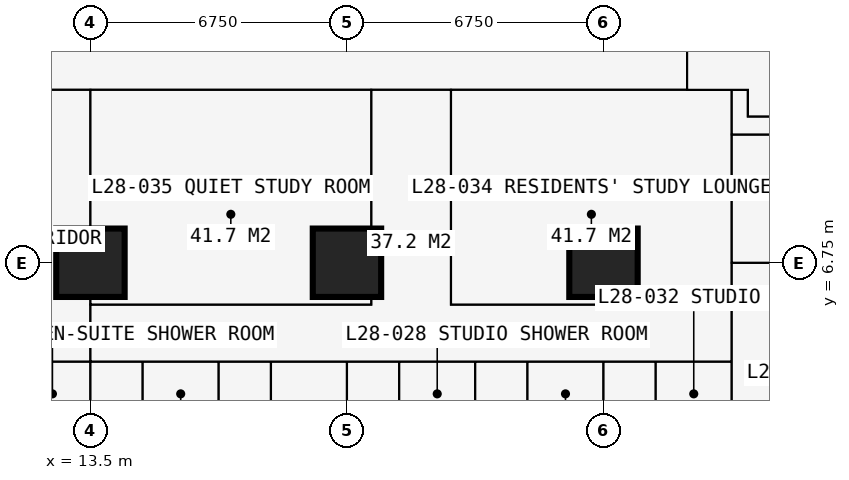
"""IFC4 building model, lengths in metres.
Left out: names, types, materials, properties, quantities, classifications, styles, units other than length and angle.
Written with IfcOpenShell. Run it as: python <this file> out.ifc"""

import sys

from ifc_helpers import new_model, si_unit, direction, frame, frame_2d, origin, origin_2d, place, context, subcontext, project, spatial, rectangle, extrude, element, fill, save


model = new_model("IFC4")
c1 = context("Model", 3, precision=1e-05, world=origin(), true_north=direction((0.0, 1.0)))
c2 = subcontext(c1, "Body", "Model", "MODEL_VIEW")
j1 = project(units=[si_unit("LENGTHUNIT", "METRE"), si_unit("PLANEANGLEUNIT", "RADIAN")], contexts=[c1])
p1 = place(None, origin())
s1 = spatial("IfcSite", under=j1, at=p1, CompositionType="ELEMENT")
p2 = place(p1, origin())
s2 = spatial("IfcBuilding", under=s1, at=p2, CompositionType="ELEMENT")
p3 = place(p2, frame((0.0, 0.0, 105.3)))
s3 = spatial("IfcBuildingStorey", under=s2, at=p3, CompositionType="ELEMENT", Elevation=105.3)
for number, where, z_axis, x_axis in (
    (1, (13.5, 6.75, 0.0), (0.0, 0.0, 1.0), (1.0, 0.0, 0.0)),
    (2, (20.25, 6.75, 0.0), (0.0, 0.0, 1.0), (1.0, 0.0, 0.0)),
    (3, (27.0, 6.75, 0.0), (0.0, 0.0, 1.0), (1.0, 0.0, 0.0)),
):
    element("IfcColumn", number, at=place(p3, frame(where, z_axis=z_axis, x_axis=x_axis)), inside=s3, PredefinedType="COLUMN", context=c2, shape_type="SweptSolid", body=[
        extrude(rectangle(XDim=1.8, YDim=1.8, at=origin_2d()), origin(), (0.0, 0.0, 1.0), 3.6),
    ])
p4 = place(p3, frame((6.75, 4.15, 0.0), z_axis=(0.0, 0.0, 1.0), x_axis=(1.0, 0.0, 0.0)))
e4 = element("IfcWall", 4, at=p4, inside=s3, PredefinedType="PARTITIONING", context=c2, shape_type="SweptSolid", body=[
    extrude(rectangle(XDim=23.625, YDim=0.1, at=frame_2d((11.812, 0.0))), origin(), (0.0, 0.0, 1.0), 3.375),
])
p5 = place(p4, frame((0.2, 0.0, 0.0)))
e5 = element("IfcOpeningElement", 5, at=p5, cuts=e4, PredefinedType="OPENING", context=c2, shape_type="SweptSolid", body=[
    extrude(rectangle(XDim=0.95, YDim=2.2, at=frame_2d((0.475, 1.1))), frame((0.0, 0.06, 0.0), z_axis=(0.0, -1.0, 0.0), x_axis=(1.0, 0.0, 0.0)), (0.0, 0.0, 1.0), 0.12),
])
p6 = place(p4, frame((3.625, 0.0, 0.0)))
e6 = element("IfcOpeningElement", 6, at=p6, cuts=e4, PredefinedType="OPENING", context=c2, shape_type="SweptSolid", body=[
    extrude(rectangle(XDim=0.95, YDim=2.2, at=frame_2d((0.475, 1.1))), frame((0.0, 0.06, 0.0), z_axis=(0.0, -1.0, 0.0), x_axis=(1.0, 0.0, 0.0)), (0.0, 0.0, 1.0), 0.12),
])
p7 = place(p4, frame((6.95, 0.0, 0.0)))
e7 = element("IfcOpeningElement", 7, at=p7, cuts=e4, PredefinedType="OPENING", context=c2, shape_type="SweptSolid", body=[
    extrude(rectangle(XDim=0.95, YDim=2.2, at=frame_2d((0.475, 1.1))), frame((0.0, 0.06, 0.0), z_axis=(0.0, -1.0, 0.0), x_axis=(1.0, 0.0, 0.0)), (0.0, 0.0, 1.0), 0.12),
])
p8 = place(p4, frame((10.375, 0.0, 0.0)))
e8 = element("IfcOpeningElement", 8, at=p8, cuts=e4, PredefinedType="OPENING", context=c2, shape_type="SweptSolid", body=[
    extrude(rectangle(XDim=0.95, YDim=2.2, at=frame_2d((0.475, 1.1))), frame((0.0, 0.06, 0.0), z_axis=(0.0, -1.0, 0.0), x_axis=(1.0, 0.0, 0.0)), (0.0, 0.0, 1.0), 0.12),
])
p9 = place(p4, frame((13.75, 0.0, 0.0)))
e9 = element("IfcOpeningElement", 9, at=p9, cuts=e4, PredefinedType="OPENING", context=c2, shape_type="SweptSolid", body=[
    extrude(rectangle(XDim=0.95, YDim=2.2, at=frame_2d((0.475, 1.1))), frame((0.0, 0.06, 0.0), z_axis=(0.0, -1.0, 0.0), x_axis=(1.0, 0.0, 0.0)), (0.0, 0.0, 1.0), 0.12),
])
p10 = place(p4, frame((17.125, 0.0, 0.0)))
e10 = element("IfcOpeningElement", 10, at=p10, cuts=e4, PredefinedType="OPENING", context=c2, shape_type="SweptSolid", body=[
    extrude(rectangle(XDim=0.95, YDim=2.2, at=frame_2d((0.475, 1.1))), frame((0.0, 0.06, 0.0), z_axis=(0.0, -1.0, 0.0), x_axis=(1.0, 0.0, 0.0)), (0.0, 0.0, 1.0), 0.12),
])
p11 = place(p4, frame((20.5, 0.0, 0.0)))
e11 = element("IfcOpeningElement", 11, at=p11, cuts=e4, PredefinedType="OPENING", context=c2, shape_type="SweptSolid", body=[
    extrude(rectangle(XDim=0.95, YDim=2.2, at=frame_2d((0.475, 1.1))), frame((0.0, 0.06, 0.0), z_axis=(0.0, -1.0, 0.0), x_axis=(1.0, 0.0, 0.0)), (0.0, 0.0, 1.0), 0.12),
])
p12 = place(p3, frame((10.125, 11.3, 0.0), z_axis=(0.0, 0.0, 1.0), x_axis=(1.0, 0.0, 0.0)))
e12 = element("IfcWall", 12, at=p12, inside=s3, PredefinedType="PARTITIONING", context=c2, shape_type="SweptSolid", body=[
    extrude(rectangle(XDim=20.675, YDim=0.15, at=frame_2d((10.337, 0.0))), origin(), (0.0, 0.0, 1.0), 3.375),
])
p13 = place(p12, frame((1.775, 0.0, 0.0)))
e13 = element("IfcOpeningElement", 13, at=p13, cuts=e12, PredefinedType="OPENING", context=c2, shape_type="SweptSolid", body=[
    extrude(rectangle(XDim=1.0, YDim=2.2, at=frame_2d((0.5, 1.1))), frame((0.0, 0.085, 0.0), z_axis=(0.0, -1.0, 0.0), x_axis=(1.0, 0.0, 0.0)), (0.0, 0.0, 1.0), 0.17),
])
p14 = place(p12, frame((11.312, 0.0, 0.0)))
e14 = element("IfcOpeningElement", 14, at=p14, cuts=e12, PredefinedType="OPENING", context=c2, shape_type="SweptSolid", body=[
    extrude(rectangle(XDim=1.0, YDim=2.2, at=frame_2d((0.5, 1.1))), frame((0.0, 0.085, 0.0), z_axis=(0.0, -1.0, 0.0), x_axis=(1.0, 0.0, 0.0)), (0.0, 0.0, 1.0), 0.17),
])
p15 = place(p3, frame((13.5, -0.734, 0.0), z_axis=(0.0, 0.0, 1.0), x_axis=(0.0, 1.0, 0.0)))
e15 = element("IfcWall", 15, at=p15, inside=s3, PredefinedType="PARTITIONING", context=c2, shape_type="SweptSolid", body=[
    extrude(rectangle(XDim=12.034, YDim=0.15, at=frame_2d((6.017, 0.0))), origin(), (0.0, 0.0, 1.0), 2.61),
])
p16 = place(p3, frame((13.5, 5.65, 0.0), z_axis=(0.0, 0.0, 1.0), x_axis=(1.0, 0.0, 0.0)))
e16 = element("IfcWall", 16, at=p16, inside=s3, PredefinedType="PARTITIONING", context=c2, shape_type="SweptSolid", body=[
    extrude(rectangle(XDim=7.387, YDim=0.15, at=frame_2d((3.694, 0.0))), origin(), (0.0, 0.0, 1.0), 3.375),
])
p17 = place(p16, frame((3.2, 0.0, 0.0)))
e17 = element("IfcOpeningElement", 17, at=p17, cuts=e16, PredefinedType="OPENING", context=c2, shape_type="SweptSolid", body=[
    extrude(rectangle(XDim=0.95, YDim=2.2, at=frame_2d((0.475, 1.1))), frame((0.0, 0.085, 0.0), z_axis=(0.0, -1.0, 0.0), x_axis=(1.0, 0.0, 0.0)), (0.0, 0.0, 1.0), 0.17),
])
p18 = place(p3, frame((14.875, 1.95, 0.0), z_axis=(0.0, 0.0, 1.0), x_axis=(0.0, 1.0, 0.0)))
e18 = element("IfcWall", 18, at=p18, inside=s3, PredefinedType="PARTITIONING", context=c2, shape_type="SweptSolid", body=[
    extrude(rectangle(XDim=2.2, YDim=0.1, at=frame_2d((1.1, 0.0))), origin(), (0.0, 0.0, 1.0), 3.375),
])
p19 = place(p18, frame((0.65, 0.0, 0.0)))
e19 = element("IfcOpeningElement", 19, at=p19, cuts=e18, PredefinedType="OPENING", context=c2, shape_type="SweptSolid", body=[
    extrude(rectangle(XDim=0.9, YDim=2.2, at=frame_2d((0.45, 1.1))), frame((0.0, 0.06, 0.0), z_axis=(0.0, -1.0, 0.0), x_axis=(1.0, 0.0, 0.0)), (0.0, 0.0, 1.0), 0.12),
])
p20 = place(p3, frame((16.875, -0.734, 0.0), z_axis=(0.0, 0.0, 1.0), x_axis=(0.0, 1.0, 0.0)))
e20 = element("IfcWall", 20, at=p20, inside=s3, PredefinedType="PARTITIONING", context=c2, shape_type="SweptSolid", body=[
    extrude(rectangle(XDim=4.884, YDim=0.175, at=frame_2d((2.442, 0.0))), origin(), (0.0, 0.0, 1.0), 3.375),
])
p21 = place(p3, frame((18.25, 1.95, 0.0), z_axis=(0.0, 0.0, 1.0), x_axis=(0.0, 1.0, 0.0)))
e21 = element("IfcWall", 21, at=p21, inside=s3, PredefinedType="PARTITIONING", context=c2, shape_type="SweptSolid", body=[
    extrude(rectangle(XDim=2.2, YDim=0.1, at=frame_2d((1.1, 0.0))), origin(), (0.0, 0.0, 1.0), 3.375),
])
p22 = place(p21, frame((0.65, 0.0, 0.0)))
e22 = element("IfcOpeningElement", 22, at=p22, cuts=e21, PredefinedType="OPENING", context=c2, shape_type="SweptSolid", body=[
    extrude(rectangle(XDim=0.9, YDim=2.2, at=frame_2d((0.45, 1.1))), frame((0.0, 0.06, 0.0), z_axis=(0.0, -1.0, 0.0), x_axis=(1.0, 0.0, 0.0)), (0.0, 0.0, 1.0), 0.12),
])
p23 = place(p3, frame((20.25, -0.734, 0.0), z_axis=(0.0, 0.0, 1.0), x_axis=(0.0, 1.0, 0.0)))
e23 = element("IfcWall", 23, at=p23, inside=s3, PredefinedType="PARTITIONING", context=c2, shape_type="SweptSolid", body=[
    extrude(rectangle(XDim=4.884, YDim=0.175, at=frame_2d((2.442, 0.0))), origin(), (0.0, 0.0, 1.0), 2.61),
])
p24 = place(p3, frame((20.887, 5.65, 0.0), z_axis=(0.0, 0.0, 1.0), x_axis=(0.0, 1.0, 0.0)))
e24 = element("IfcWall", 24, at=p24, inside=s3, PredefinedType="PARTITIONING", context=c2, shape_type="SweptSolid", body=[
    extrude(rectangle(XDim=5.65, YDim=0.15, at=frame_2d((2.825, 0.0))), origin(), (0.0, 0.0, 1.0), 3.375),
])
p25 = place(p3, frame((21.625, 1.95, 0.0), z_axis=(0.0, 0.0, 1.0), x_axis=(0.0, 1.0, 0.0)))
e25 = element("IfcWall", 25, at=p25, inside=s3, PredefinedType="PARTITIONING", context=c2, shape_type="SweptSolid", body=[
    extrude(rectangle(XDim=2.2, YDim=0.1, at=frame_2d((1.1, 0.0))), origin(), (0.0, 0.0, 1.0), 3.375),
])
p26 = place(p25, frame((0.65, 0.0, 0.0)))
e26 = element("IfcOpeningElement", 26, at=p26, cuts=e25, PredefinedType="OPENING", context=c2, shape_type="SweptSolid", body=[
    extrude(rectangle(XDim=0.9, YDim=2.2, at=frame_2d((0.45, 1.1))), frame((0.0, 0.06, 0.0), z_axis=(0.0, -1.0, 0.0), x_axis=(1.0, 0.0, 0.0)), (0.0, 0.0, 1.0), 0.12),
])
p27 = place(p3, frame((22.988, 5.65, 0.0), z_axis=(0.0, 0.0, 1.0), x_axis=(1.0, 0.0, 0.0)))
e27 = element("IfcWall", 27, at=p27, inside=s3, PredefinedType="PARTITIONING", context=c2, shape_type="SweptSolid", body=[
    extrude(rectangle(XDim=7.387, YDim=0.15, at=frame_2d((3.694, 0.0))), origin(), (0.0, 0.0, 1.0), 3.375),
])
p28 = place(p27, frame((2.15, 0.0, 0.0)))
e28 = element("IfcOpeningElement", 28, at=p28, cuts=e27, PredefinedType="OPENING", context=c2, shape_type="SweptSolid", body=[
    extrude(rectangle(XDim=0.95, YDim=2.2, at=frame_2d((0.475, 1.1))), frame((0.0, 0.085, 0.0), z_axis=(0.0, -1.0, 0.0), x_axis=(1.0, 0.0, 0.0)), (0.0, 0.0, 1.0), 0.17),
])
p29 = place(p3, frame((22.988, 5.65, 0.0), z_axis=(0.0, 0.0, 1.0), x_axis=(0.0, 1.0, 0.0)))
e29 = element("IfcWall", 29, at=p29, inside=s3, PredefinedType="PARTITIONING", context=c2, shape_type="SweptSolid", body=[
    extrude(rectangle(XDim=5.65, YDim=0.15, at=frame_2d((2.825, 0.0))), origin(), (0.0, 0.0, 1.0), 3.375),
])
p30 = place(p3, frame((23.625, -0.734, 0.0), z_axis=(0.0, 0.0, 1.0), x_axis=(0.0, 1.0, 0.0)))
e30 = element("IfcWall", 30, at=p30, inside=s3, PredefinedType="PARTITIONING", context=c2, shape_type="SweptSolid", body=[
    extrude(rectangle(XDim=4.884, YDim=0.175, at=frame_2d((2.442, 0.0))), origin(), (0.0, 0.0, 1.0), 3.375),
])
p31 = place(p3, frame((25.0, 1.95, 0.0), z_axis=(0.0, 0.0, 1.0), x_axis=(0.0, 1.0, 0.0)))
e31 = element("IfcWall", 31, at=p31, inside=s3, PredefinedType="PARTITIONING", context=c2, shape_type="SweptSolid", body=[
    extrude(rectangle(XDim=2.2, YDim=0.1, at=frame_2d((1.1, 0.0))), origin(), (0.0, 0.0, 1.0), 3.375),
])
p32 = place(p31, frame((0.65, 0.0, 0.0)))
e32 = element("IfcOpeningElement", 32, at=p32, cuts=e31, PredefinedType="OPENING", context=c2, shape_type="SweptSolid", body=[
    extrude(rectangle(XDim=0.9, YDim=2.2, at=frame_2d((0.45, 1.1))), frame((0.0, 0.06, 0.0), z_axis=(0.0, -1.0, 0.0), x_axis=(1.0, 0.0, 0.0)), (0.0, 0.0, 1.0), 0.12),
])
p33 = place(p3, frame((27.0, -0.734, 0.0), z_axis=(0.0, 0.0, 1.0), x_axis=(0.0, 1.0, 0.0)))
e33 = element("IfcWall", 33, at=p33, inside=s3, PredefinedType="PARTITIONING", context=c2, shape_type="SweptSolid", body=[
    extrude(rectangle(XDim=4.884, YDim=0.175, at=frame_2d((2.442, 0.0))), origin(), (0.0, 0.0, 1.0), 2.61),
])
p34 = place(p3, frame((28.375, 1.95, 0.0), z_axis=(0.0, 0.0, 1.0), x_axis=(0.0, 1.0, 0.0)))
e34 = element("IfcWall", 34, at=p34, inside=s3, PredefinedType="PARTITIONING", context=c2, shape_type="SweptSolid", body=[
    extrude(rectangle(XDim=2.2, YDim=0.1, at=frame_2d((1.1, 0.0))), origin(), (0.0, 0.0, 1.0), 3.375),
])
p35 = place(p34, frame((0.65, 0.0, 0.0)))
e35 = element("IfcOpeningElement", 35, at=p35, cuts=e34, PredefinedType="OPENING", context=c2, shape_type="SweptSolid", body=[
    extrude(rectangle(XDim=0.9, YDim=2.2, at=frame_2d((0.45, 1.1))), frame((0.0, 0.06, 0.0), z_axis=(0.0, -1.0, 0.0), x_axis=(1.0, 0.0, 0.0)), (0.0, 0.0, 1.0), 0.12),
])
p36 = place(p3, frame((29.2, 11.3, 0.0), z_axis=(0.0, 0.0, 1.0), x_axis=(0.0, 1.0, 0.0)))
e36 = element("IfcWall", 36, at=p36, inside=s3, PredefinedType="PARTITIONING", context=c2, shape_type="SweptSolid", body=[
    extrude(rectangle(XDim=17.9, YDim=0.2, at=frame_2d((8.95, 0.0))), origin(), (0.0, 0.0, 1.0), 3.375),
])
p37 = place(p36, frame((8.35, 0.0, 0.0)))
e37 = element("IfcOpeningElement", 37, at=p37, cuts=e36, PredefinedType="OPENING", context=c2, shape_type="SweptSolid", body=[
    extrude(rectangle(XDim=1.2, YDim=2.2, at=frame_2d((0.6, 1.1))), frame((0.0, 0.11, 0.0), z_axis=(0.0, -1.0, 0.0), x_axis=(1.0, 0.0, 0.0)), (0.0, 0.0, 1.0), 0.22),
])
p38 = place(p3, frame((30.375, -0.734, 0.0), z_axis=(0.0, 0.0, 1.0), x_axis=(0.0, 1.0, 0.0)))
e38 = element("IfcWall", 38, at=p38, inside=s3, PredefinedType="PARTITIONING", context=c2, shape_type="SweptSolid", body=[
    extrude(rectangle(XDim=12.034, YDim=0.15, at=frame_2d((6.017, 0.0))), origin(), (0.0, 0.0, 1.0), 3.375),
])
p39 = place(p3, frame((30.375, 6.75, 0.0), z_axis=(0.0, 0.0, 1.0), x_axis=(1.0, 0.0, 0.0)))
e39 = element("IfcWall", 39, at=p39, inside=s3, PredefinedType="PARTITIONING", context=c2, shape_type="SweptSolid", body=[
    extrude(rectangle(XDim=10.859, YDim=0.15, at=frame_2d((5.429, 0.0))), origin(), (0.0, 0.0, 1.0), 2.877),
])
p40 = place(p39, frame((1.45, 0.0, 0.0)))
e40 = element("IfcOpeningElement", 40, at=p40, cuts=e39, PredefinedType="OPENING", context=c2, shape_type="SweptSolid", body=[
    extrude(rectangle(XDim=1.0, YDim=2.2, at=frame_2d((0.5, 1.1))), frame((0.0, 0.085, 0.0), z_axis=(0.0, -1.0, 0.0), x_axis=(1.0, 0.0, 0.0)), (0.0, 0.0, 1.0), 0.17),
])
p41 = place(p3, frame((30.375, 10.125, 0.0), z_axis=(0.0, 0.0, 1.0), x_axis=(1.0, 0.0, 0.0)))
e41 = element("IfcWall", 41, at=p41, inside=s3, PredefinedType="PARTITIONING", context=c2, shape_type="SweptSolid", body=[
    extrude(rectangle(XDim=10.859, YDim=0.15, at=frame_2d((5.429, 0.0))), origin(), (0.0, 0.0, 1.0), 3.375),
])
p42 = place(p41, frame((2.5, 0.0, 0.0)))
e42 = element("IfcOpeningElement", 42, at=p42, cuts=e41, PredefinedType="OPENING", context=c2, shape_type="SweptSolid", body=[
    extrude(rectangle(XDim=1.0, YDim=2.2, at=frame_2d((0.5, 1.1))), frame((0.0, 0.085, 0.0), z_axis=(0.0, -1.0, 0.0), x_axis=(1.0, 0.0, 0.0)), (0.0, 0.0, 1.0), 0.17),
])
p43 = place(p3, frame((30.8, 10.6, 0.0), z_axis=(0.0, 0.0, 1.0), x_axis=(0.0, 1.0, 0.0)))
e43 = element("IfcWall", 43, at=p43, inside=s3, PredefinedType="PARTITIONING", context=c2, shape_type="SweptSolid", body=[
    extrude(rectangle(XDim=0.7, YDim=0.15, at=frame_2d((0.35, 0.0))), origin(), (0.0, 0.0, 1.0), 3.375),
])
p44 = place(p3, frame((30.8, 10.6, 0.0), z_axis=(0.0, 0.0, 1.0), x_axis=(1.0, 0.0, 0.0)))
e44 = element("IfcWall", 44, at=p44, inside=s3, PredefinedType="PARTITIONING", context=c2, shape_type="SweptSolid", body=[
    extrude(rectangle(XDim=1.85, YDim=0.15, at=frame_2d((0.925, 0.0))), origin(), (0.0, 0.0, 1.0), 3.375),
])
p45 = place(p13, origin())
e45 = element("IfcDoor", 45, at=p45, inside=s3, OperationType="SINGLE_SWING_LEFT", PredefinedType="DOOR", context=c2, shape_type="SweptSolid", body=[
    extrude(rectangle(XDim=1.0, YDim=2.2, at=frame_2d((0.5, 1.1))), frame((0.0, 0.025, 0.0), z_axis=(0.0, -1.0, 0.0), x_axis=(1.0, 0.0, 0.0)), (0.0, 0.0, 1.0), 0.05),
])
fill(e13, e45)
p46 = place(p7, origin())
e46 = element("IfcDoor", 46, at=p46, inside=s3, OperationType="SINGLE_SWING_LEFT", PredefinedType="DOOR", context=c2, shape_type="SweptSolid", body=[
    extrude(rectangle(XDim=0.95, YDim=2.2, at=frame_2d((0.475, 1.1))), frame((0.0, 0.025, 0.0), z_axis=(0.0, -1.0, 0.0), x_axis=(1.0, 0.0, 0.0)), (0.0, 0.0, 1.0), 0.05),
])
fill(e7, e46)
p47 = place(p19, origin())
e47 = element("IfcDoor", 47, at=p47, inside=s3, OperationType="SINGLE_SWING_RIGHT", PredefinedType="DOOR", context=c2, shape_type="SweptSolid", body=[
    extrude(rectangle(XDim=0.9, YDim=2.2, at=frame_2d((0.45, 1.1))), frame((0.0, 0.025, 0.0), z_axis=(0.0, -1.0, 0.0), x_axis=(1.0, 0.0, 0.0)), (0.0, 0.0, 1.0), 0.05),
])
fill(e19, e47)
p48 = place(p8, origin())
e48 = element("IfcDoor", 48, at=p48, inside=s3, OperationType="SINGLE_SWING_LEFT", PredefinedType="DOOR", context=c2, shape_type="SweptSolid", body=[
    extrude(rectangle(XDim=0.95, YDim=2.2, at=frame_2d((0.475, 1.1))), frame((0.0, 0.025, 0.0), z_axis=(0.0, -1.0, 0.0), x_axis=(1.0, 0.0, 0.0)), (0.0, 0.0, 1.0), 0.05),
])
fill(e8, e48)
p49 = place(p22, origin())
e49 = element("IfcDoor", 49, at=p49, inside=s3, OperationType="SINGLE_SWING_RIGHT", PredefinedType="DOOR", context=c2, shape_type="SweptSolid", body=[
    extrude(rectangle(XDim=0.9, YDim=2.2, at=frame_2d((0.45, 1.1))), frame((0.0, 0.025, 0.0), z_axis=(0.0, -1.0, 0.0), x_axis=(1.0, 0.0, 0.0)), (0.0, 0.0, 1.0), 0.05),
])
fill(e22, e49)
p50 = place(p9, origin())
e50 = element("IfcDoor", 50, at=p50, inside=s3, OperationType="SINGLE_SWING_LEFT", PredefinedType="DOOR", context=c2, shape_type="SweptSolid", body=[
    extrude(rectangle(XDim=0.95, YDim=2.2, at=frame_2d((0.475, 1.1))), frame((0.0, 0.025, 0.0), z_axis=(0.0, -1.0, 0.0), x_axis=(1.0, 0.0, 0.0)), (0.0, 0.0, 1.0), 0.05),
])
fill(e9, e50)
p51 = place(p26, origin())
e51 = element("IfcDoor", 51, at=p51, inside=s3, OperationType="SINGLE_SWING_RIGHT", PredefinedType="DOOR", context=c2, shape_type="SweptSolid", body=[
    extrude(rectangle(XDim=0.9, YDim=2.2, at=frame_2d((0.45, 1.1))), frame((0.0, 0.025, 0.0), z_axis=(0.0, -1.0, 0.0), x_axis=(1.0, 0.0, 0.0)), (0.0, 0.0, 1.0), 0.05),
])
fill(e26, e51)
p52 = place(p10, origin())
e52 = element("IfcDoor", 52, at=p52, inside=s3, OperationType="SINGLE_SWING_LEFT", PredefinedType="DOOR", context=c2, shape_type="SweptSolid", body=[
    extrude(rectangle(XDim=0.95, YDim=2.2, at=frame_2d((0.475, 1.1))), frame((0.0, 0.025, 0.0), z_axis=(0.0, -1.0, 0.0), x_axis=(1.0, 0.0, 0.0)), (0.0, 0.0, 1.0), 0.05),
])
fill(e10, e52)
p53 = place(p32, origin())
e53 = element("IfcDoor", 53, at=p53, inside=s3, OperationType="SINGLE_SWING_RIGHT", PredefinedType="DOOR", context=c2, shape_type="SweptSolid", body=[
    extrude(rectangle(XDim=0.9, YDim=2.2, at=frame_2d((0.45, 1.1))), frame((0.0, 0.025, 0.0), z_axis=(0.0, -1.0, 0.0), x_axis=(1.0, 0.0, 0.0)), (0.0, 0.0, 1.0), 0.05),
])
fill(e32, e53)
p54 = place(p11, origin())
e54 = element("IfcDoor", 54, at=p54, inside=s3, OperationType="SINGLE_SWING_LEFT", PredefinedType="DOOR", context=c2, shape_type="SweptSolid", body=[
    extrude(rectangle(XDim=0.95, YDim=2.2, at=frame_2d((0.475, 1.1))), frame((0.0, 0.025, 0.0), z_axis=(0.0, -1.0, 0.0), x_axis=(1.0, 0.0, 0.0)), (0.0, 0.0, 1.0), 0.05),
])
fill(e11, e54)
p55 = place(p35, origin())
e55 = element("IfcDoor", 55, at=p55, inside=s3, OperationType="SINGLE_SWING_RIGHT", PredefinedType="DOOR", context=c2, shape_type="SweptSolid", body=[
    extrude(rectangle(XDim=0.9, YDim=2.2, at=frame_2d((0.45, 1.1))), frame((0.0, 0.025, 0.0), z_axis=(0.0, -1.0, 0.0), x_axis=(1.0, 0.0, 0.0)), (0.0, 0.0, 1.0), 0.05),
])
fill(e35, e55)
p56 = place(p14, origin())
e56 = element("IfcDoor", 56, at=p56, inside=s3, OperationType="SINGLE_SWING_LEFT", PredefinedType="DOOR", context=c2, shape_type="SweptSolid", body=[
    extrude(rectangle(XDim=1.0, YDim=2.2, at=frame_2d((0.5, 1.1))), frame((0.0, 0.025, 0.0), z_axis=(0.0, -1.0, 0.0), x_axis=(1.0, 0.0, 0.0)), (0.0, 0.0, 1.0), 0.05),
])
fill(e14, e56)
p57 = place(p28, origin())
e57 = element("IfcDoor", 57, at=p57, inside=s3, OperationType="SINGLE_SWING_LEFT", PredefinedType="DOOR", context=c2, shape_type="SweptSolid", body=[
    extrude(rectangle(XDim=0.95, YDim=2.2, at=frame_2d((0.475, 1.1))), frame((0.0, 0.025, 0.0), z_axis=(0.0, -1.0, 0.0), x_axis=(1.0, 0.0, 0.0)), (0.0, 0.0, 1.0), 0.05),
])
fill(e28, e57)
p58 = place(p17, origin())
e58 = element("IfcDoor", 58, at=p58, inside=s3, OperationType="SINGLE_SWING_LEFT", PredefinedType="DOOR", context=c2, shape_type="SweptSolid", body=[
    extrude(rectangle(XDim=0.95, YDim=2.2, at=frame_2d((0.475, 1.1))), frame((0.0, 0.025, 0.0), z_axis=(0.0, -1.0, 0.0), x_axis=(1.0, 0.0, 0.0)), (0.0, 0.0, 1.0), 0.05),
])
fill(e17, e58)
save(model, sys.argv[1])
